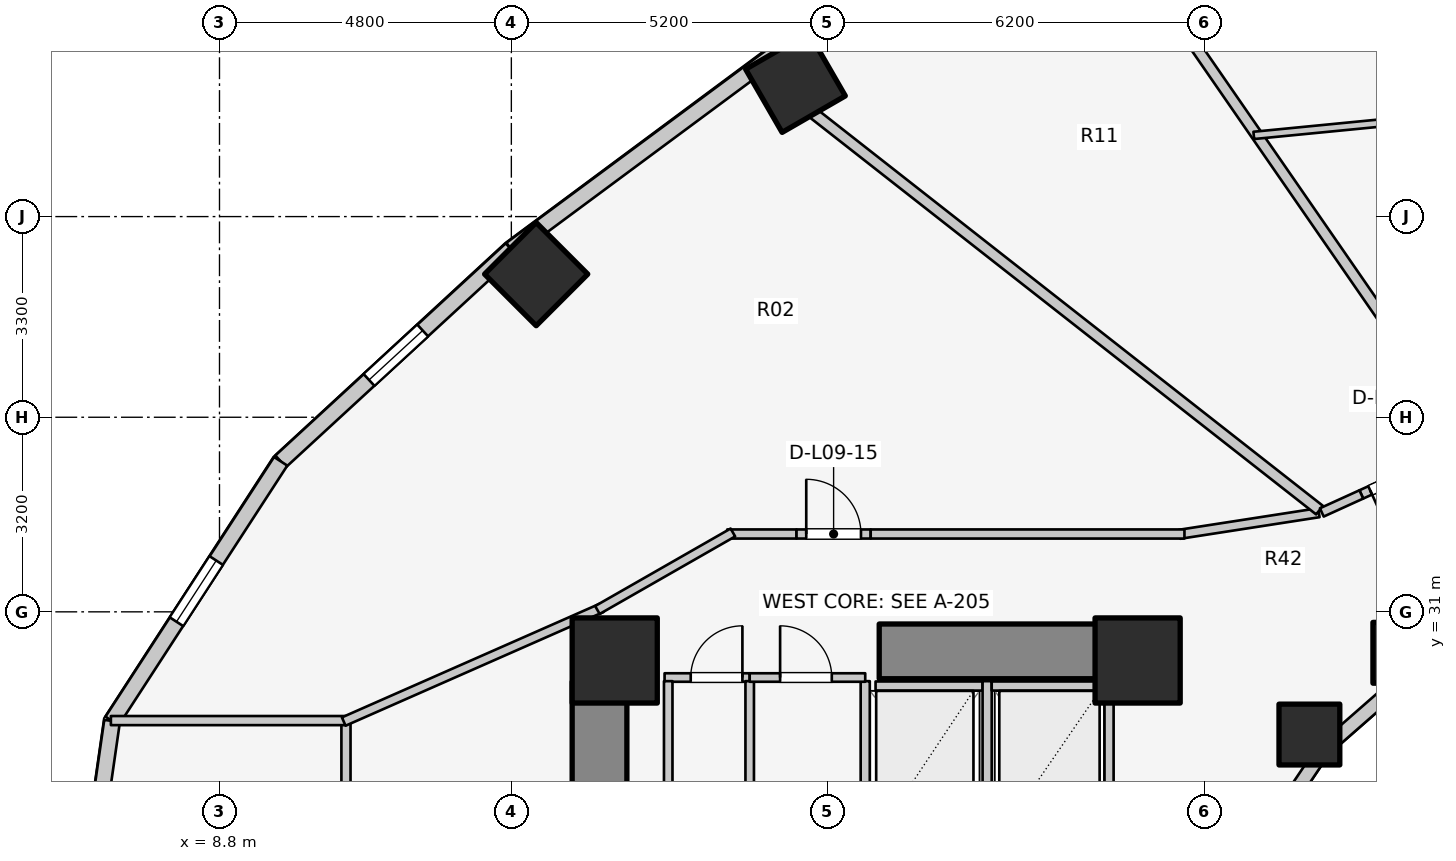
"""IFC4 building model, lengths in metres.
Left out: names, types, materials, properties, quantities, classifications, styles, units other than length and angle.
Written with IfcOpenShell. Run it as: python <this file> out.ifc"""

import sys

from ifc_helpers import new_model, si_unit, direction, frame, frame_2d, origin, origin_2d, place, context, subcontext, project, spatial, rectangle, extrude, element, fill, save


model = new_model("IFC4")
c1 = context("Model", 3, precision=1e-05, world=origin(), true_north=direction((0.0, 1.0)))
c2 = subcontext(c1, "Body", "Model", "MODEL_VIEW")
j1 = project(units=[si_unit("LENGTHUNIT", "METRE"), si_unit("PLANEANGLEUNIT", "RADIAN")], contexts=[c1])
p1 = place(None, origin())
s1 = spatial("IfcSite", under=j1, at=p1, CompositionType="ELEMENT")
p2 = place(p1, origin())
s2 = spatial("IfcBuilding", under=s1, at=p2, CompositionType="ELEMENT")
p3 = place(p2, frame((0.0, 0.0, 33.8)))
s3 = spatial("IfcBuildingStorey", under=s2, at=p3, CompositionType="ELEMENT", Elevation=33.8)
p4 = place(p3, frame((15.05, 17.05, 0.0), z_axis=(0.0, 0.0, 1.0), x_axis=(0.0, 1.0, 0.0)))
e1 = element("IfcWall", 1, at=p4, inside=s3, PredefinedType="SHEAR", context=c2, shape_type="SweptSolid", body=[
    extrude(rectangle(XDim=12.8, YDim=0.9, at=frame_2d((6.4, 0.0))), origin(), (0.0, 0.0, 1.0), 3.1),
])
p5 = place(p3, frame((19.65, 30.35, 0.0), z_axis=(0.0, 0.0, 1.0), x_axis=(1.0, 0.0, 0.0)))
e2 = element("IfcWall", 2, at=p5, inside=s3, PredefinedType="SHEAR", context=c2, shape_type="SweptSolid", body=[
    extrude(rectangle(XDim=4.5, YDim=0.9, at=frame_2d((2.25, 0.0))), origin(), (0.0, 0.0, 1.0), 3.1),
])
for number, where, z_axis, x_axis in (
    (3, (23.9, 30.2, 0.0), (0.0, 0.0, 1.0), (1.0, 0.0, 0.0)),
    (4, (15.3, 30.2, 0.0), (0.0, 0.0, 1.0), (1.0, 0.0, 0.0)),
):
    element("IfcColumn", number, at=place(p3, frame(where, z_axis=z_axis, x_axis=x_axis)), inside=s3, PredefinedType="COLUMN", context=c2, shape_type="SweptSolid", body=[
        extrude(rectangle(XDim=1.4, YDim=1.4, at=origin_2d()), origin(), (0.0, 0.0, 1.0), 3.1),
    ])
p6 = place(p3, frame((28.27, 30.327, 0.0), z_axis=(0.0, 0.0, 1.0), x_axis=(1.0, 0.0, 0.0)))
e5 = element("IfcColumn", 5, at=p6, inside=s3, PredefinedType="COLUMN", context=c2, shape_type="SweptSolid", body=[
    extrude(rectangle(XDim=1.0, YDim=1.0, at=origin_2d()), origin(), (0.0, 0.0, 1.0), 3.1),
])
p7 = place(p3, frame((18.273, 39.704, 0.0), z_axis=(0.0, 0.0, 1.0), x_axis=(-0.5, 0.866025403784, 0.0)))
e6 = element("IfcColumn", 6, at=p7, inside=s3, PredefinedType="COLUMN", context=c2, shape_type="SweptSolid", body=[
    extrude(rectangle(XDim=1.2, YDim=1.2, at=origin_2d()), origin(), (0.0, 0.0, 1.0), 3.1),
])
p8 = place(p3, frame((26.725, 28.982, 0.0), z_axis=(0.0, 0.0, 1.0), x_axis=(1.0, 0.0, 0.0)))
e7 = element("IfcColumn", 7, at=p8, inside=s3, PredefinedType="COLUMN", context=c2, shape_type="SweptSolid", body=[
    extrude(rectangle(XDim=1.0, YDim=1.0, at=origin_2d()), origin(), (0.0, 0.0, 1.0), 3.1),
])
p9 = place(p3, frame((14.008, 36.554, 0.0), z_axis=(0.0, 0.0, 1.0), x_axis=(-0.707106781187, 0.707106781187, 0.0)))
e8 = element("IfcColumn", 8, at=p9, inside=s3, PredefinedType="COLUMN", context=c2, shape_type="SweptSolid", body=[
    extrude(rectangle(XDim=1.2, YDim=1.2, at=origin_2d()), origin(), (0.0, 0.0, 1.0), 3.1),
])
p10 = place(p3, frame((28.44, 30.032, 0.0), z_axis=(0.0, 0.0, 1.0), x_axis=(-0.752576694707, -0.658504607869, 0.0)))
e9 = element("IfcWall", 9, at=p10, inside=s3, PredefinedType="STANDARD", context=c2, shape_type="SweptSolid", body=[
    extrude(rectangle(XDim=1.959, YDim=0.23, at=frame_2d((0.98, 0.0))), origin(), (0.0, 0.0, 1.0), 1.22),
])
p11 = place(p3, frame((26.965, 28.742, 0.0), z_axis=(0.0, 0.0, 1.0), x_axis=(-0.558197800898, -0.829707909492, 0.0)))
e10 = element("IfcWall", 10, at=p11, inside=s3, PredefinedType="STANDARD", context=c2, shape_type="SweptSolid", body=[
    extrude(rectangle(XDim=2.027, YDim=0.23, at=frame_2d((1.013, 0.0))), origin(), (0.0, 0.0, 1.0), 1.22),
])
p12 = place(p3, frame((17.958, 40.197, 0.0), z_axis=(0.0, 0.0, 1.0), x_axis=(-0.803477531792, -0.595335078679, 0.0)))
e11 = element("IfcWall", 11, at=p12, inside=s3, PredefinedType="STANDARD", context=c2, shape_type="SweptSolid", body=[
    extrude(rectangle(XDim=5.43, YDim=0.26, at=frame_2d((2.715, 0.0))), origin(), (0.0, 0.0, 1.0), 1.22),
])
p13 = place(p3, frame((13.595, 36.965, 0.0), z_axis=(0.0, 0.0, 1.0), x_axis=(-0.735655109293, -0.67735630223, 0.0)))
e12 = element("IfcWall", 12, at=p13, inside=s3, PredefinedType="STANDARD", context=c2, shape_type="SweptSolid", body=[
    extrude(rectangle(XDim=5.151, YDim=0.26, at=frame_2d((2.575, 0.0))), origin(), (0.0, 0.0, 1.0), 1.22),
])
p14 = place(p13, frame((1.976, 0.0, 0.15)))
e13 = element("IfcOpeningElement", 13, at=p14, cuts=e12, PredefinedType="OPENING", context=c2, shape_type="SweptSolid", body=[
    extrude(rectangle(XDim=1.2, YDim=0.9, at=frame_2d((0.6, 0.45))), frame((0.0, 0.14, 0.0), z_axis=(0.0, -1.0, 0.0), x_axis=(1.0, 0.0, 0.0)), (0.0, 0.0, 1.0), 0.28),
])
p15 = place(p3, frame((9.806, 33.476, 0.0), z_axis=(0.0, 0.0, 1.0), x_axis=(-0.544578722263, -0.838709732421, 0.0)))
e14 = element("IfcWall", 14, at=p15, inside=s3, PredefinedType="STANDARD", context=c2, shape_type="SweptSolid", body=[
    extrude(rectangle(XDim=5.092, YDim=0.26, at=frame_2d((2.546, 0.0))), origin(), (0.0, 0.0, 1.0), 1.22),
])
p16 = place(p15, frame((1.946, 0.0, 0.15)))
e15 = element("IfcOpeningElement", 15, at=p16, cuts=e14, PredefinedType="OPENING", context=c2, shape_type="SweptSolid", body=[
    extrude(rectangle(XDim=1.2, YDim=0.9, at=frame_2d((0.6, 0.45))), frame((0.0, 0.14, 0.0), z_axis=(0.0, -1.0, 0.0), x_axis=(1.0, 0.0, 0.0)), (0.0, 0.0, 1.0), 0.28),
])
p17 = place(p3, frame((7.033, 29.205, 0.0), z_axis=(0.0, 0.0, 1.0), x_axis=(-0.142528001686, -0.989790770181, 0.0)))
e16 = element("IfcWall", 16, at=p17, inside=s3, PredefinedType="STANDARD", context=c2, shape_type="SweptSolid", body=[
    extrude(rectangle(XDim=6.269, YDim=0.26, at=frame_2d((3.135, 0.0))), origin(), (0.0, 0.0, 1.0), 2.57),
])
p18 = place(p17, frame((2.385, 0.0, 0.75)))
e17 = element("IfcOpeningElement", 17, at=p18, cuts=e16, PredefinedType="OPENING", context=c2, shape_type="SweptSolid", body=[
    extrude(rectangle(XDim=1.5, YDim=1.6, at=frame_2d((0.75, 0.8))), frame((0.0, 0.14, 0.0), z_axis=(0.0, -1.0, 0.0), x_axis=(1.0, 0.0, 0.0)), (0.0, 0.0, 1.0), 0.28),
])
p19 = place(p3, frame((19.59, 29.78, 0.0), z_axis=(0.0, 0.0, 1.0), x_axis=(1.0, 0.0, 0.0)))
e18 = element("IfcWall", 18, at=p19, inside=s3, PredefinedType="SOLIDWALL", context=c2, shape_type="SweptSolid", body=[
    extrude(rectangle(XDim=1.76, YDim=0.15, at=frame_2d((0.88, 0.0))), origin(), (0.0, 0.0, 1.0), 2.575),
])
for number, where, z_axis, x_axis in (
    (19, (19.42, 27.14, 0.0), (0.0, 0.0, 1.0), (0.0, 1.0, 0.0)),
    (20, (21.425, 27.14, 0.0), (0.0, 0.0, 1.0), (0.0, 1.0, 0.0)),
):
    element("IfcWall", number, at=place(p3, frame(where, z_axis=z_axis, x_axis=x_axis)), inside=s3, PredefinedType="SOLIDWALL", context=c2, shape_type="SweptSolid", body=[
        extrude(rectangle(XDim=2.72, YDim=0.15, at=frame_2d((1.36, 0.0))), origin(), (0.0, 0.0, 1.0), 2.575),
    ])
p20 = place(p3, frame((21.5, 29.78, 0.0), z_axis=(0.0, 0.0, 1.0), x_axis=(1.0, 0.0, 0.0)))
e21 = element("IfcWall", 21, at=p20, inside=s3, PredefinedType="SOLIDWALL", context=c2, shape_type="SweptSolid", body=[
    extrude(rectangle(XDim=1.76, YDim=0.15, at=frame_2d((0.88, 0.0))), origin(), (0.0, 0.0, 1.0), 2.575),
])
p21 = place(p3, frame((23.43, 27.14, 0.0), z_axis=(0.0, 0.0, 1.0), x_axis=(0.0, 1.0, 0.0)))
e22 = element("IfcWall", 22, at=p21, inside=s3, PredefinedType="SOLIDWALL", context=c2, shape_type="SweptSolid", body=[
    extrude(rectangle(XDim=2.72, YDim=0.15, at=frame_2d((1.36, 0.0))), origin(), (0.0, 0.0, 1.0), 2.575),
])
p22 = place(p3, frame((16.12, 29.92, 0.0), z_axis=(0.0, 0.0, 1.0), x_axis=(1.0, 0.0, 0.0)))
e23 = element("IfcWall", 23, at=p22, inside=s3, PredefinedType="PLUMBINGWALL", context=c2, shape_type="SweptSolid", body=[
    extrude(rectangle(XDim=1.4, YDim=0.14, at=frame_2d((0.7, 0.0))), origin(), (0.0, 0.0, 1.0), 2.575),
])
p23 = place(p22, frame((0.43, 0.0, 0.0)))
e24 = element("IfcOpeningElement", 24, at=p23, cuts=e23, PredefinedType="OPENING", context=c2, shape_type="SweptSolid", body=[
    extrude(rectangle(XDim=0.85, YDim=2.05, at=frame_2d((0.425, 1.025))), frame((0.0, 0.08, 0.0), z_axis=(0.0, -1.0, 0.0), x_axis=(1.0, 0.0, 0.0)), (0.0, 0.0, 1.0), 0.16),
])
for number, where, z_axis, x_axis in (
    (25, (16.18, 25.98, 0.0), (0.0, 0.0, 1.0), (0.0, 1.0, 0.0)),
    (26, (17.52, 25.98, 0.0), (0.0, 0.0, 1.0), (0.0, 1.0, 0.0)),
):
    element("IfcWall", number, at=place(p3, frame(where, z_axis=z_axis, x_axis=x_axis)), inside=s3, PredefinedType="PLUMBINGWALL", context=c2, shape_type="SweptSolid", body=[
        extrude(rectangle(XDim=3.88, YDim=0.14, at=frame_2d((1.94, 0.0))), origin(), (0.0, 0.0, 1.0), 2.575),
    ])
p24 = place(p3, frame((17.52, 29.92, 0.0), z_axis=(0.0, 0.0, 1.0), x_axis=(1.0, 0.0, 0.0)))
e27 = element("IfcWall", 27, at=p24, inside=s3, PredefinedType="PLUMBINGWALL", context=c2, shape_type="SweptSolid", body=[
    extrude(rectangle(XDim=1.9, YDim=0.14, at=frame_2d((0.95, 0.0))), origin(), (0.0, 0.0, 1.0), 2.575),
])
p25 = place(p24, frame((0.5, 0.0, 0.0)))
e28 = element("IfcOpeningElement", 28, at=p25, cuts=e27, PredefinedType="OPENING", context=c2, shape_type="SweptSolid", body=[
    extrude(rectangle(XDim=0.85, YDim=2.05, at=frame_2d((0.425, 1.025))), frame((0.0, 0.08, 0.0), z_axis=(0.0, -1.0, 0.0), x_axis=(1.0, 0.0, 0.0)), (0.0, 0.0, 1.0), 0.16),
])
p26 = place(p3, frame((10.88, 16.748, 0.0), z_axis=(0.0, 0.0, 1.0), x_axis=(0.0, 1.0, 0.0)))
e29 = element("IfcWall", 29, at=p26, inside=s3, PredefinedType="PARTITIONING", context=c2, shape_type="SweptSolid", body=[
    extrude(rectangle(XDim=12.503, YDim=0.15, at=frame_2d((6.252, 0.0))), origin(), (0.0, 0.0, 1.0), 2.12),
])
p27 = place(p3, frame((7.014, 29.212, 0.0), z_axis=(0.0, 0.0, 1.0), x_axis=(1.0, 0.0, 0.0)))
e30 = element("IfcWall", 30, at=p27, inside=s3, PredefinedType="PARTITIONING", context=c2, shape_type="SweptSolid", body=[
    extrude(rectangle(XDim=3.866, YDim=0.15, at=frame_2d((1.933, 0.0))), origin(), (0.0, 0.0, 1.0), 2.575),
])
p28 = place(p3, frame((10.844, 29.196, 0.0), z_axis=(0.0, 0.0, 1.0), x_axis=(0.91502756289, 0.403391322604, 0.0)))
e31 = element("IfcWall", 31, at=p28, inside=s3, PredefinedType="PARTITIONING", context=c2, shape_type="SweptSolid", body=[
    extrude(rectangle(XDim=4.637, YDim=0.15, at=frame_2d((2.319, 0.0))), origin(), (0.0, 0.0, 1.0), 1.22),
])
p29 = place(p3, frame((26.881, 32.631, 0.0), z_axis=(0.0, 0.0, 1.0), x_axis=(-0.988184633586, -0.153268163508, 0.0)))
e32 = element("IfcWall", 32, at=p29, inside=s3, PredefinedType="PARTITIONING", context=c2, shape_type="SweptSolid", body=[
    extrude(rectangle(XDim=2.318, YDim=0.15, at=frame_2d((1.159, 0.0))), origin(), (0.0, 0.0, 1.0), 1.957),
])
p30 = place(p3, frame((17.15, 32.28, 0.0), z_axis=(0.0, 0.0, 1.0), x_axis=(1.0, 0.0, 0.0)))
e33 = element("IfcWall", 33, at=p30, inside=s3, PredefinedType="PARTITIONING", context=c2, shape_type="SweptSolid", body=[
    extrude(rectangle(XDim=1.14, YDim=0.15, at=frame_2d((0.57, 0.0))), origin(), (0.0, 0.0, 1.0), 2.575),
])
p31 = place(p3, frame((18.29, 32.28, 0.0), z_axis=(0.0, 0.0, 1.0), x_axis=(1.0, 0.0, 0.0)))
e34 = element("IfcWall", 34, at=p31, inside=s3, PredefinedType="PARTITIONING", context=c2, shape_type="SweptSolid", body=[
    extrude(rectangle(XDim=1.22, YDim=0.15, at=frame_2d((0.61, 0.0))), origin(), (0.0, 0.0, 1.0), 2.575),
])
p32 = place(p31, frame((0.16, 0.0, 0.0)))
e35 = element("IfcOpeningElement", 35, at=p32, cuts=e34, PredefinedType="OPENING", context=c2, shape_type="SweptSolid", body=[
    extrude(rectangle(XDim=0.9, YDim=2.1, at=frame_2d((0.45, 1.05))), frame((0.0, 0.085, 0.0), z_axis=(0.0, -1.0, 0.0), x_axis=(1.0, 0.0, 0.0)), (0.0, 0.0, 1.0), 0.17),
])
p33 = place(p3, frame((19.51, 32.28, 0.0), z_axis=(0.0, 0.0, 1.0), x_axis=(1.0, 0.0, 0.0)))
e36 = element("IfcWall", 36, at=p33, inside=s3, PredefinedType="PARTITIONING", context=c2, shape_type="SweptSolid", body=[
    extrude(rectangle(XDim=5.16, YDim=0.15, at=frame_2d((2.58, 0.0))), origin(), (0.0, 0.0, 1.0), 1.957),
])
p34 = place(p3, frame((17.243, 32.305, 0.0), z_axis=(0.0, 0.0, 1.0), x_axis=(-0.867991349648, -0.496579315857, 0.0)))
e37 = element("IfcWall", 37, at=p34, inside=s3, PredefinedType="PARTITIONING", context=c2, shape_type="SweptSolid", body=[
    extrude(rectangle(XDim=2.567, YDim=0.15, at=frame_2d((1.283, 0.0))), origin(), (0.0, 0.0, 1.0), 1.22),
])
p35 = place(p3, frame((29.347, 33.796, 0.0), z_axis=(0.0, 0.0, 1.0), x_axis=(-0.568631434817, 0.822592421153, 0.0)))
e38 = element("IfcWall", 38, at=p35, inside=s3, PredefinedType="PARTITIONING", context=c2, shape_type="SweptSolid", body=[
    extrude(rectangle(XDim=9.394, YDim=0.18, at=frame_2d((4.697, 0.0))), origin(), (0.0, 0.0, 1.0), 1.957),
])
p36 = place(p3, frame((26.892, 32.673, 0.0), z_axis=(0.0, 0.0, 1.0), x_axis=(-0.78700868866, 0.616941912966, 0.0)))
e39 = element("IfcWall", 39, at=p36, inside=s3, PredefinedType="PARTITIONING", context=c2, shape_type="SweptSolid", body=[
    extrude(rectangle(XDim=10.583, YDim=0.18, at=frame_2d((5.292, 0.0))), origin(), (0.0, 0.0, 1.0), 1.957),
])
p37 = place(p3, frame((28.278, 39.076, 0.0), z_axis=(0.0, 0.0, 1.0), x_axis=(-0.995257910667, -0.097271225219, 0.0)))
e40 = element("IfcWall", 40, at=p37, inside=s3, PredefinedType="MOVABLE", context=c2, shape_type="SweptSolid", body=[
    extrude(rectangle(XDim=2.48, YDim=0.12, at=frame_2d((1.24, 0.0))), origin(), (0.0, 0.0, 1.0), 1.957),
])
p38 = place(p3, frame((28.735, 33.457, 0.0), z_axis=(0.0, 0.0, 1.0), x_axis=(-0.910241350267, -0.414078113722, 0.0)))
e41 = element("IfcWall", 41, at=p38, inside=s3, PredefinedType="PARTITIONING", context=c2, shape_type="SweptSolid", body=[
    extrude(rectangle(XDim=1.27, YDim=0.15, at=frame_2d((0.635, 0.0))), origin(), (0.0, 0.0, 1.0), 2.16),
])
p39 = place(p38, frame((0.16, 0.0, 0.0)))
e42 = element("IfcOpeningElement", 42, at=p39, cuts=e41, PredefinedType="OPENING", context=c2, shape_type="SweptSolid", body=[
    extrude(rectangle(XDim=0.95, YDim=2.1, at=frame_2d((0.475, 1.05))), frame((0.0, 0.085, 0.0), z_axis=(0.0, -1.0, 0.0), x_axis=(1.0, 0.0, 0.0)), (0.0, 0.0, 1.0), 0.17),
])
p40 = place(p3, frame((27.579, 32.931, 0.0), z_axis=(0.0, 0.0, 1.0), x_axis=(-0.910108713425, -0.414369556976, 0.0)))
e43 = element("IfcWall", 43, at=p40, inside=s3, PredefinedType="PARTITIONING", context=c2, shape_type="SweptSolid", body=[
    extrude(rectangle(XDim=0.714, YDim=0.15, at=frame_2d((0.357, 0.0))), origin(), (0.0, 0.0, 1.0), 2.575),
])
p41 = place(p14, origin())
e44 = element("IfcWindow", 44, at=p41, inside=s3, PartitioningType="SINGLE_PANEL", PredefinedType="WINDOW", context=c2, shape_type="SweptSolid", body=[
    extrude(rectangle(XDim=1.2, YDim=0.9, at=frame_2d((0.6, 0.45))), frame((0.0, 0.03, 0.0), z_axis=(0.0, -1.0, 0.0), x_axis=(1.0, 0.0, 0.0)), (0.0, 0.0, 1.0), 0.06),
])
fill(e13, e44)
p42 = place(p16, origin())
e45 = element("IfcWindow", 45, at=p42, inside=s3, PartitioningType="SINGLE_PANEL", PredefinedType="WINDOW", context=c2, shape_type="SweptSolid", body=[
    extrude(rectangle(XDim=1.2, YDim=0.9, at=frame_2d((0.6, 0.45))), frame((0.0, 0.03, 0.0), z_axis=(0.0, -1.0, 0.0), x_axis=(1.0, 0.0, 0.0)), (0.0, 0.0, 1.0), 0.06),
])
fill(e15, e45)
p43 = place(p23, origin())
e46 = element("IfcDoor", 46, at=p43, inside=s3, OperationType="SINGLE_SWING_RIGHT", PredefinedType="DOOR", context=c2, shape_type="SweptSolid", body=[
    extrude(rectangle(XDim=0.85, YDim=2.05, at=frame_2d((0.425, 1.025))), frame((0.0, 0.025, 0.0), z_axis=(0.0, -1.0, 0.0), x_axis=(1.0, 0.0, 0.0)), (0.0, 0.0, 1.0), 0.05),
])
fill(e24, e46)
p44 = place(p25, origin())
e47 = element("IfcDoor", 47, at=p44, inside=s3, OperationType="SINGLE_SWING_LEFT", PredefinedType="DOOR", context=c2, shape_type="SweptSolid", body=[
    extrude(rectangle(XDim=0.85, YDim=2.05, at=frame_2d((0.425, 1.025))), frame((0.0, 0.025, 0.0), z_axis=(0.0, -1.0, 0.0), x_axis=(1.0, 0.0, 0.0)), (0.0, 0.0, 1.0), 0.05),
])
fill(e28, e47)
p45 = place(p32, origin())
e48 = element("IfcDoor", 48, at=p45, inside=s3, OperationType="SINGLE_SWING_LEFT", PredefinedType="DOOR", context=c2, shape_type="SweptSolid", body=[
    extrude(rectangle(XDim=0.9, YDim=2.1, at=frame_2d((0.45, 1.05))), frame((0.0, 0.025, 0.0), z_axis=(0.0, -1.0, 0.0), x_axis=(1.0, 0.0, 0.0)), (0.0, 0.0, 1.0), 0.05),
])
fill(e35, e48)
p46 = place(p39, origin())
e49 = element("IfcDoor", 49, at=p46, inside=s3, OperationType="SINGLE_SWING_RIGHT", PredefinedType="DOOR", context=c2, shape_type="SweptSolid", body=[
    extrude(rectangle(XDim=0.95, YDim=2.1, at=frame_2d((0.475, 1.05))), frame((0.0, 0.025, 0.0), z_axis=(0.0, -1.0, 0.0), x_axis=(1.0, 0.0, 0.0)), (0.0, 0.0, 1.0), 0.05),
])
fill(e42, e49)
save(model, sys.argv[1])
